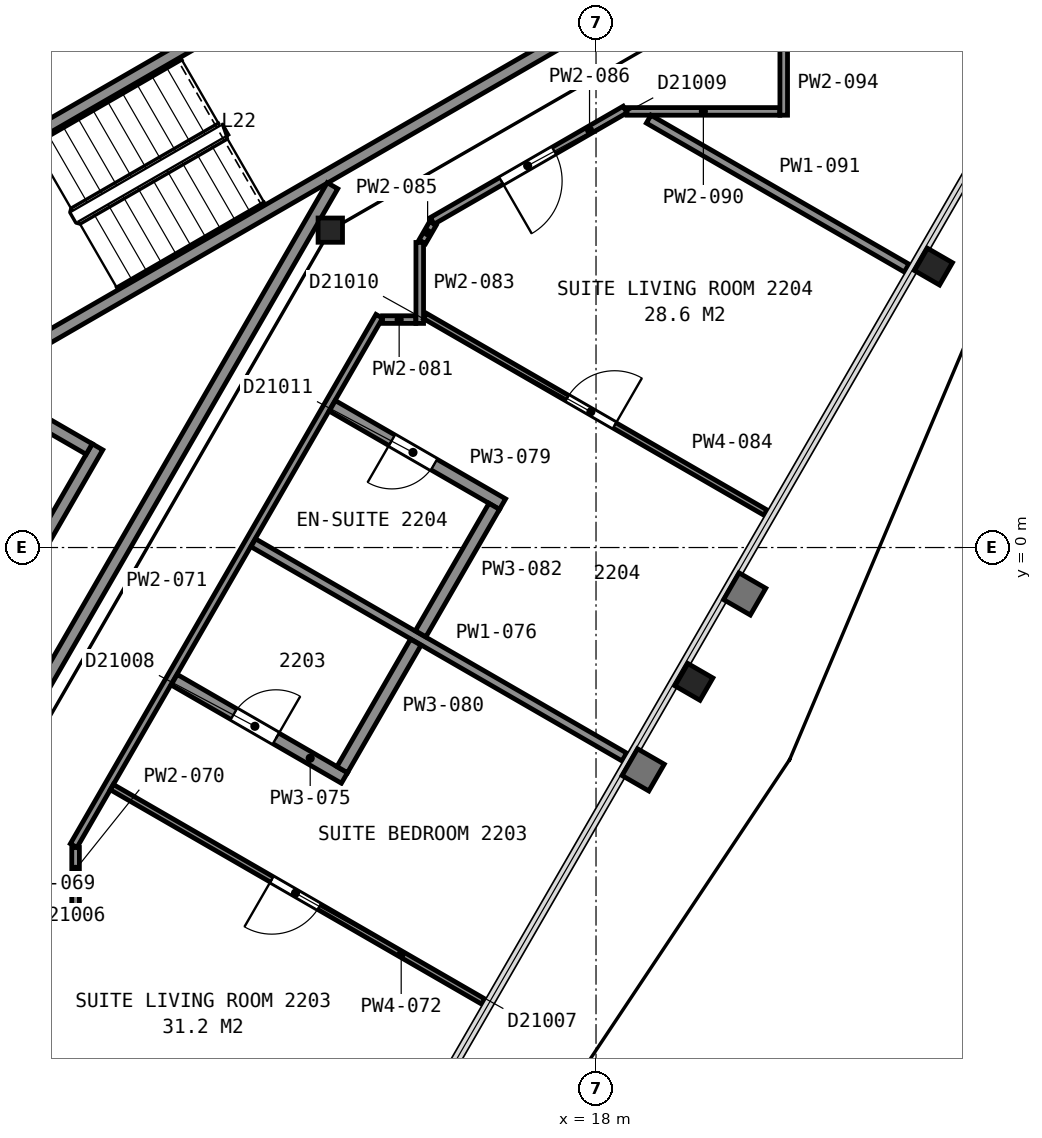
"""IFC4 building model, lengths in metres.
Left out: names, types, materials, properties, quantities, classifications, styles, units other than length and angle.
Written with IfcOpenShell. Run it as: python <this file> out.ifc"""

import sys

from ifc_helpers import new_model, si_unit, direction, frame, frame_2d, origin, origin_2d, place, context, subcontext, project, spatial, rectangle, i_section, extrude, element, fill, save


model = new_model("IFC4")
c1 = context("Model", 3, precision=1e-05, world=origin(), true_north=direction((0.0, 1.0)))
c2 = subcontext(c1, "Body", "Model", "MODEL_VIEW")
j1 = project(units=[si_unit("LENGTHUNIT", "METRE"), si_unit("PLANEANGLEUNIT", "RADIAN")], contexts=[c1])
p1 = place(None, origin())
s1 = spatial("IfcSite", under=j1, at=p1, CompositionType="ELEMENT")
p2 = place(p1, origin())
s2 = spatial("IfcBuilding", under=s1, at=p2, CompositionType="ELEMENT")
p3 = place(p2, frame((0.0, 0.0, 96.4)))
s3 = spatial("IfcBuildingStorey", under=s2, at=p3, CompositionType="ELEMENT", Elevation=96.4)
p4 = place(p3, frame((19.61, -2.21, 0.0), z_axis=(0.0, 0.0, 1.0), x_axis=(-0.5, -0.866025403784, 0.0)))
e1 = element("IfcColumn", 1, at=p4, inside=s3, PredefinedType="COLUMN", context=c2, shape_type="SweptSolid", body=[
    extrude(i_section(OverallWidth=0.424, OverallDepth=0.475, WebThickness=0.048, FlangeThickness=0.077, FilletRadius=0.015, at=origin_2d()), origin(), (0.0, 0.0, 1.0), 3.56),
])
p5 = place(p3, frame((23.55, 4.62, 0.0), z_axis=(0.0, 0.0, 1.0), x_axis=(-0.5, -0.866025403784, 0.0)))
e2 = element("IfcColumn", 2, at=p5, inside=s3, PredefinedType="COLUMN", context=c2, shape_type="SweptSolid", body=[
    extrude(i_section(OverallWidth=0.424, OverallDepth=0.475, WebThickness=0.048, FlangeThickness=0.077, FilletRadius=0.015, at=origin_2d()), origin(), (0.0, 0.0, 1.0), 3.555),
])
p6 = place(p3, frame((13.63, 5.22, 0.0), z_axis=(0.0, 0.0, 1.0), x_axis=(1.0, 0.0, 0.0)))
e3 = element("IfcColumn", 3, at=p6, inside=s3, PredefinedType="COLUMN", context=c2, shape_type="SweptSolid", body=[
    extrude(i_section(OverallWidth=0.401, OverallDepth=0.399, WebThickness=0.025, FlangeThickness=0.04, FilletRadius=0.015, at=origin_2d()), origin(), (0.0, 0.0, 1.0), 3.6),
])
for number, where, z_axis, x_axis in (
    (4, (6.178, 5.299, 0.0), (0.0, 0.0, 1.0), (0.866, 0.5, 0.0)),
    (5, (7.678, 2.701, 0.0), (0.0, 0.0, 1.0), (0.866, 0.5, 0.0)),
):
    element("IfcWall", number, at=place(p3, frame(where, z_axis=z_axis, x_axis=x_axis)), inside=s3, PredefinedType="PARTITIONING", context=c2, shape_type="SweptSolid", body=[
        extrude(rectangle(XDim=12.0, YDim=0.2, at=frame_2d((6.0, 0.0))), origin(), (0.0, 0.0, 1.0), 3.35),
    ])
p7 = place(p3, frame((7.451, -2.414, 0.0), z_axis=(0.0, 0.0, 1.0), x_axis=(0.500016218704, 0.866016039709, 0.0)))
e6 = element("IfcWall", 6, at=p7, inside=s3, PredefinedType="PARTITIONING", context=c2, shape_type="SweptSolid", body=[
    extrude(rectangle(XDim=4.7, YDim=0.2, at=frame_2d((2.35, 0.0))), origin(), (0.0, 0.0, 1.0), 3.6),
])
p8 = place(p3, frame((9.665, 1.62, 0.0), z_axis=(0.0, 0.0, 1.0), x_axis=(-0.866002029911, 0.500040482552, 0.0)))
e7 = element("IfcWall", 7, at=p8, inside=s3, PredefinedType="PARTITIONING", context=c2, shape_type="SweptSolid", body=[
    extrude(rectangle(XDim=1.75, YDim=0.2, at=frame_2d((0.875, 0.0))), origin(), (0.0, 0.0, 1.0), 3.6),
])
p9 = place(p3, frame((8.492, -3.012, 0.0), z_axis=(0.0, 0.0, 1.0), x_axis=(0.499972957231, 0.866041016371, 0.0)))
e8 = element("IfcWall", 8, at=p9, inside=s3, PredefinedType="PARTITIONING", context=c2, shape_type="SweptSolid", body=[
    extrude(rectangle(XDim=10.349, YDim=0.2, at=frame_2d((5.174, 0.0))), origin(), (0.0, 0.0, 1.0), 3.35),
])
p10 = place(p3, frame((7.72, -7.963, 0.0), z_axis=(0.0, 0.0, 1.0), x_axis=(0.865980767462, -0.500077304409, 0.0)))
e9 = element("IfcWall", 9, at=p10, inside=s3, PredefinedType="PARTITIONING", context=c2, shape_type="SweptSolid", body=[
    extrude(rectangle(XDim=7.047, YDim=0.15, at=frame_2d((3.524, 0.0))), origin(), (0.0, 0.0, 1.0), 2.613),
])
p11 = place(p3, frame((8.82, -6.071, 0.0), z_axis=(0.0, 0.0, 1.0), x_axis=(1.0, 0.0, 0.0)))
e10 = element("IfcWall", 10, at=p11, inside=s3, PredefinedType="PARTITIONING", context=c2, shape_type="SweptSolid", body=[
    extrude(rectangle(XDim=0.556, YDim=0.125, at=frame_2d((0.278, 0.0))), origin(), (0.0, 0.0, 1.0), 2.613),
])
p12 = place(p3, frame((9.441, -6.134, 0.0), z_axis=(0.0, 0.0, 1.0), x_axis=(0.0, 1.0, 0.0)))
e11 = element("IfcWall", 11, at=p12, inside=s3, PredefinedType="PARTITIONING", context=c2, shape_type="SweptSolid", body=[
    extrude(rectangle(XDim=1.2, YDim=0.125, at=frame_2d((0.6, 0.0))), origin(), (0.0, 0.0, 1.0), 2.613),
])
p13 = place(p3, frame((9.41, -4.902, 0.0), z_axis=(0.0, 0.0, 1.0), x_axis=(0.499971244726, 0.866042005013, 0.0)))
e12 = element("IfcWall", 12, at=p13, inside=s3, PredefinedType="PARTITIONING", context=c2, shape_type="SweptSolid", body=[
    extrude(rectangle(XDim=10.052, YDim=0.125, at=frame_2d((5.026, 0.0))), origin(), (0.0, 0.0, 1.0), 2.613),
])
p14 = place(p3, frame((10.037, -3.94, 0.0), z_axis=(0.0, 0.0, 1.0), x_axis=(0.866063951978, -0.499933226626, 0.0)))
e13 = element("IfcWall", 13, at=p14, inside=s3, PredefinedType="PARTITIONING", context=c2, shape_type="SweptSolid", body=[
    extrude(rectangle(XDim=7.052, YDim=0.1, at=frame_2d((3.526, 0.0))), origin(), (0.0, 0.0, 1.0), 2.613),
])
p15 = place(p14, frame((3.038, 0.0, 0.0)))
e14 = element("IfcOpeningElement", 14, at=p15, cuts=e13, PredefinedType="OPENING", context=c2, shape_type="SweptSolid", body=[
    extrude(rectangle(XDim=0.9, YDim=2.1, at=frame_2d((0.45, 1.05))), frame((0.0, 0.06, 0.0), z_axis=(0.0, -1.0, 0.0), x_axis=(1.0, 0.0, 0.0)), (0.0, 0.0, 1.0), 0.12),
])
p16 = place(p3, frame((11.062, -2.174, 0.0), z_axis=(0.0, 0.0, 1.0), x_axis=(0.866078705744, -0.499907666931, 0.0)))
e15 = element("IfcWall", 15, at=p16, inside=s3, PredefinedType="PARTITIONING", context=c2, shape_type="SweptSolid", body=[
    extrude(rectangle(XDim=3.233, YDim=0.2, at=frame_2d((1.616, 0.0))), origin(), (0.0, 0.0, 1.0), 2.613),
])
p17 = place(p16, frame((1.133, 0.0, 0.0)))
e16 = element("IfcOpeningElement", 16, at=p17, cuts=e15, PredefinedType="OPENING", context=c2, shape_type="SweptSolid", body=[
    extrude(rectangle(XDim=0.8, YDim=2.1, at=frame_2d((0.4, 1.05))), frame((0.0, 0.11, 0.0), z_axis=(0.0, -1.0, 0.0), x_axis=(1.0, 0.0, 0.0)), (0.0, 0.0, 1.0), 0.22),
])
p18 = place(p3, frame((12.363, 0.078, 0.0), z_axis=(0.0, 0.0, 1.0), x_axis=(0.86605175433, -0.499954356739, 0.0)))
e17 = element("IfcWall", 17, at=p18, inside=s3, PredefinedType="PARTITIONING", context=c2, shape_type="SweptSolid", body=[
    extrude(rectangle(XDim=7.048, YDim=0.15, at=frame_2d((3.524, 0.0))), origin(), (0.0, 0.0, 1.0), 2.613),
])
p19 = place(p3, frame((16.463, 0.714, 0.0), z_axis=(0.0, 0.0, 1.0), x_axis=(-0.86609757561, 0.499874973892, 0.0)))
e18 = element("IfcWall", 18, at=p19, inside=s3, PredefinedType="PARTITIONING", context=c2, shape_type="SweptSolid", body=[
    extrude(rectangle(XDim=3.233, YDim=0.2, at=frame_2d((1.617, 0.0))), origin(), (0.0, 0.0, 1.0), 2.613),
])
p20 = place(p19, frame((1.301, 0.0, 0.0)))
e19 = element("IfcOpeningElement", 19, at=p20, cuts=e18, PredefinedType="OPENING", context=c2, shape_type="SweptSolid", body=[
    extrude(rectangle(XDim=0.8, YDim=2.1, at=frame_2d((0.4, 1.05))), frame((0.0, 0.11, 0.0), z_axis=(0.0, -1.0, 0.0), x_axis=(1.0, 0.0, 0.0)), (0.0, 0.0, 1.0), 0.22),
])
p21 = place(p3, frame((13.826, -3.653, 0.0), z_axis=(0.0, 0.0, 1.0), x_axis=(0.499719542643, 0.866187265377, 0.0)))
e20 = element("IfcWall", 20, at=p21, inside=s3, PredefinedType="PARTITIONING", context=c2, shape_type="SweptSolid", body=[
    extrude(rectangle(XDim=2.42, YDim=0.2, at=frame_2d((1.21, 0.0))), origin(), (0.0, 0.0, 1.0), 2.613),
])
p22 = place(p3, frame((14.489, 3.749, 0.0), z_axis=(0.0, 0.0, 1.0), x_axis=(1.0, 0.0, 0.0)))
e21 = element("IfcWall", 21, at=p22, inside=s3, PredefinedType="PARTITIONING", context=c2, shape_type="SweptSolid", body=[
    extrude(rectangle(XDim=0.547, YDim=0.125, at=frame_2d((0.273, 0.0))), origin(), (0.0, 0.0, 1.0), 2.613),
])
p23 = place(p3, frame((15.115, -1.419, 0.0), z_axis=(0.0, 0.0, 1.0), x_axis=(0.50002218001, 0.866012597771, 0.0)))
e22 = element("IfcWall", 22, at=p23, inside=s3, PredefinedType="PARTITIONING", context=c2, shape_type="SweptSolid", body=[
    extrude(rectangle(XDim=2.421, YDim=0.2, at=frame_2d((1.21, 0.0))), origin(), (0.0, 0.0, 1.0), 2.613),
])
p24 = place(p3, frame((15.101, 3.687, 0.0), z_axis=(0.0, 0.0, 1.0), x_axis=(0.0, 1.0, 0.0)))
e23 = element("IfcWall", 23, at=p24, inside=s3, PredefinedType="PARTITIONING", context=c2, shape_type="SweptSolid", body=[
    extrude(rectangle(XDim=1.331, YDim=0.125, at=frame_2d((0.666, 0.0))), origin(), (0.0, 0.0, 1.0), 2.613),
])
p25 = place(p3, frame((20.787, 0.575, 0.0), z_axis=(0.0, 0.0, 1.0), x_axis=(-0.866012632051, 0.500022120638, 0.0)))
e24 = element("IfcWall", 24, at=p25, inside=s3, PredefinedType="PARTITIONING", context=c2, shape_type="SweptSolid", body=[
    extrude(rectangle(XDim=6.465, YDim=0.1, at=frame_2d((3.232, 0.0))), origin(), (0.0, 0.0, 1.0), 2.613),
])
p26 = place(p25, frame((2.866, 0.0, 0.0)))
e25 = element("IfcOpeningElement", 25, at=p26, cuts=e24, PredefinedType="OPENING", context=c2, shape_type="SweptSolid", body=[
    extrude(rectangle(XDim=0.9, YDim=2.1, at=frame_2d((0.45, 1.05))), frame((0.0, 0.06, 0.0), z_axis=(0.0, -1.0, 0.0), x_axis=(1.0, 0.0, 0.0)), (0.0, 0.0, 1.0), 0.12),
])
p27 = place(p3, frame((15.144, 5.029, 0.0), z_axis=(0.0, 0.0, 1.0), x_axis=(0.499682006278, 0.86620891972, 0.0)))
e26 = element("IfcWall", 26, at=p27, inside=s3, PredefinedType="PARTITIONING", context=c2, shape_type="SweptSolid", body=[
    extrude(rectangle(XDim=0.348, YDim=0.125, at=frame_2d((0.174, 0.0))), origin(), (0.0, 0.0, 1.0), 2.613),
])
p28 = place(p3, frame((18.478, 7.204, 0.0), z_axis=(0.0, 0.0, 1.0), x_axis=(-0.866011320536, -0.500024392108, 0.0)))
e27 = element("IfcWall", 27, at=p28, inside=s3, PredefinedType="PARTITIONING", context=c2, shape_type="SweptSolid", body=[
    extrude(rectangle(XDim=3.663, YDim=0.125, at=frame_2d((1.832, 0.0))), origin(), (0.0, 0.0, 1.0), 2.613),
])
p29 = place(p28, frame((1.351, 0.0, 0.0)))
e28 = element("IfcOpeningElement", 28, at=p29, cuts=e27, PredefinedType="OPENING", context=c2, shape_type="SweptSolid", body=[
    extrude(rectangle(XDim=1.0, YDim=2.1, at=frame_2d((0.5, 1.05))), frame((0.0, 0.073, 0.0), z_axis=(0.0, -1.0, 0.0), x_axis=(1.0, 0.0, 0.0)), (0.0, 0.0, 1.0), 0.145),
])
p30 = place(p3, frame((18.509, 7.173, 0.0), z_axis=(0.0, 0.0, 1.0), x_axis=(1.0, 0.0, 0.0)))
e29 = element("IfcWall", 29, at=p30, inside=s3, PredefinedType="PARTITIONING", context=c2, shape_type="SweptSolid", body=[
    extrude(rectangle(XDim=2.513, YDim=0.125, at=frame_2d((1.256, 0.0))), origin(), (0.0, 0.0, 1.0), 2.613),
])
p31 = place(p3, frame((18.866, 7.046, 0.0), z_axis=(0.0, 0.0, 1.0), x_axis=(0.866042025588, -0.499971209087, 0.0)))
e30 = element("IfcWall", 30, at=p31, inside=s3, PredefinedType="PARTITIONING", context=c2, shape_type="SweptSolid", body=[
    extrude(rectangle(XDim=4.899, YDim=0.15, at=frame_2d((2.45, 0.0))), origin(), (0.0, 0.0, 1.0), 2.613),
])
p32 = place(p3, frame((21.087, 10.209, 0.0), z_axis=(0.0, 0.0, 1.0), x_axis=(0.0, -1.0, 0.0)))
e31 = element("IfcWall", 31, at=p32, inside=s3, PredefinedType="PARTITIONING", context=c2, shape_type="SweptSolid", body=[
    extrude(rectangle(XDim=3.099, YDim=0.125, at=frame_2d((1.549, 0.0))), origin(), (0.0, 0.0, 1.0), 2.613),
])
p33 = place(p32, frame((1.037, 0.0, 0.0)))
e32 = element("IfcOpeningElement", 32, at=p33, cuts=e31, PredefinedType="OPENING", context=c2, shape_type="SweptSolid", body=[
    extrude(rectangle(XDim=1.0, YDim=2.1, at=frame_2d((0.5, 1.05))), frame((0.0, 0.073, 0.0), z_axis=(0.0, -1.0, 0.0), x_axis=(1.0, 0.0, 0.0)), (0.0, 0.0, 1.0), 0.145),
])
p34 = place(p15, origin())
e33 = element("IfcDoor", 33, at=p34, inside=s3, OperationType="SINGLE_SWING_LEFT", PredefinedType="DOOR", context=c2, shape_type="SweptSolid", body=[
    extrude(rectangle(XDim=0.9, YDim=2.1, at=frame_2d((0.45, 1.05))), frame((0.0, 0.025, 0.0), z_axis=(0.0, -1.0, 0.0), x_axis=(1.0, 0.0, 0.0)), (0.0, 0.0, 1.0), 0.05),
])
fill(e14, e33)
p35 = place(p17, origin())
e34 = element("IfcDoor", 34, at=p35, inside=s3, OperationType="SINGLE_SWING_RIGHT", PredefinedType="DOOR", context=c2, shape_type="SweptSolid", body=[
    extrude(rectangle(XDim=0.8, YDim=2.1, at=frame_2d((0.4, 1.05))), frame((0.0, 0.025, 0.0), z_axis=(0.0, -1.0, 0.0), x_axis=(1.0, 0.0, 0.0)), (0.0, 0.0, 1.0), 0.05),
])
fill(e16, e34)
p36 = place(p20, origin())
e35 = element("IfcDoor", 35, at=p36, inside=s3, OperationType="SINGLE_SWING_RIGHT", PredefinedType="DOOR", context=c2, shape_type="SweptSolid", body=[
    extrude(rectangle(XDim=0.8, YDim=2.1, at=frame_2d((0.4, 1.05))), frame((0.0, 0.025, 0.0), z_axis=(0.0, -1.0, 0.0), x_axis=(1.0, 0.0, 0.0)), (0.0, 0.0, 1.0), 0.05),
])
fill(e19, e35)
p37 = place(p26, origin())
e36 = element("IfcDoor", 36, at=p37, inside=s3, OperationType="SINGLE_SWING_LEFT", PredefinedType="DOOR", context=c2, shape_type="SweptSolid", body=[
    extrude(rectangle(XDim=0.9, YDim=2.1, at=frame_2d((0.45, 1.05))), frame((0.0, 0.025, 0.0), z_axis=(0.0, -1.0, 0.0), x_axis=(1.0, 0.0, 0.0)), (0.0, 0.0, 1.0), 0.05),
])
fill(e25, e36)
p38 = place(p29, origin())
e37 = element("IfcDoor", 37, at=p38, inside=s3, OperationType="SINGLE_SWING_RIGHT", PredefinedType="DOOR", context=c2, shape_type="SweptSolid", body=[
    extrude(rectangle(XDim=1.0, YDim=2.1, at=frame_2d((0.5, 1.05))), frame((0.0, 0.025, 0.0), z_axis=(0.0, -1.0, 0.0), x_axis=(1.0, 0.0, 0.0)), (0.0, 0.0, 1.0), 0.05),
])
fill(e28, e37)
save(model, sys.argv[1])
